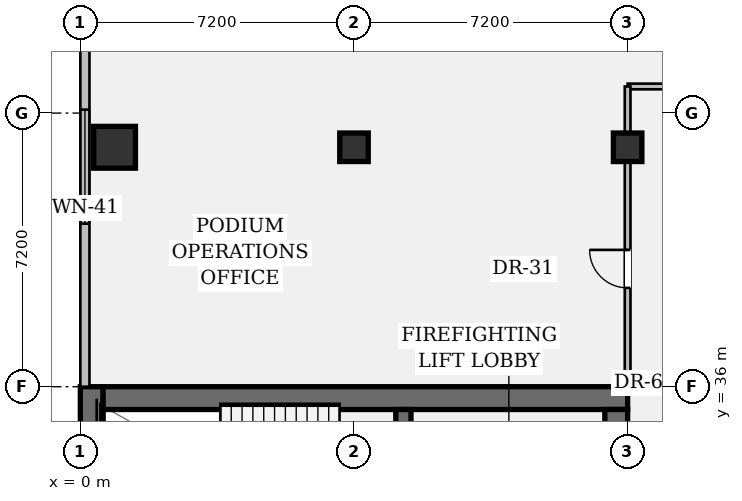
"""IFC4 building model, lengths in metres.
Left out: names, types, materials, properties, quantities, classifications, styles, units other than length and angle.
Written with IfcOpenShell. Run it as: python <this file> out.ifc"""

import sys

from ifc_helpers import new_model, si_unit, direction, frame, frame_2d, origin, origin_2d, place, context, subcontext, project, spatial, rectangle, hollow_rectangle, extrude, element, fill, save


model = new_model("IFC4")
c1 = context("Model", 3, precision=1e-05, world=origin(), true_north=direction((0.0, 1.0)))
c2 = subcontext(c1, "Body", "Model", "MODEL_VIEW")
j1 = project(units=[si_unit("LENGTHUNIT", "METRE"), si_unit("PLANEANGLEUNIT", "RADIAN")], contexts=[c1])
p1 = place(None, origin())
s1 = spatial("IfcSite", under=j1, at=p1, CompositionType="ELEMENT")
p2 = place(p1, origin())
s2 = spatial("IfcBuilding", under=s1, at=p2, CompositionType="ELEMENT")
p3 = place(p2, frame((0.0, 0.0, 17.85)))
s3 = spatial("IfcBuildingStorey", under=s2, at=p3, CompositionType="ELEMENT", Elevation=17.85)
p4 = place(p3, frame((0.3, 7.2, 0.0), z_axis=(0.0, 0.0, 1.0), x_axis=(0.0, 1.0, 0.0)))
e1 = element("IfcWall", 1, at=p4, inside=s3, PredefinedType="SHEAR", context=c2, shape_type="SweptSolid", body=[
    extrude(rectangle(XDim=28.8, YDim=0.6, at=frame_2d((14.4, 0.0))), origin(), (0.0, 0.0, 1.0), 3.91),
])
p5 = place(p3, frame((0.6, 35.7, 0.0), z_axis=(0.0, 0.0, 1.0), x_axis=(1.0, 0.0, 0.0)))
e2 = element("IfcWall", 2, at=p5, inside=s3, PredefinedType="SHEAR", context=c2, shape_type="SweptSolid", body=[
    extrude(rectangle(XDim=13.8, YDim=0.6, at=frame_2d((6.9, 0.0))), origin(), (0.0, 0.0, 1.0), 3.91),
])
p6 = place(p3, frame((14.1, 35.4, 0.0), z_axis=(0.0, 0.0, 1.0), x_axis=(0.0, -1.0, 0.0)))
e3 = element("IfcWall", 3, at=p6, inside=s3, PredefinedType="SHEAR", context=c2, shape_type="SweptSolid", body=[
    extrude(rectangle(XDim=27.6, YDim=0.6, at=frame_2d((13.8, 0.0))), origin(), (0.0, 0.0, 1.0), 3.91),
])
p7 = place(p6, frame((1.3, 0.0, 0.0)))
e4 = element("IfcOpeningElement", 4, at=p7, cuts=e3, PredefinedType="OPENING", context=c2, shape_type="SweptSolid", body=[
    extrude(rectangle(XDim=1.2, YDim=2.15, at=frame_2d((0.6, 1.075))), frame((0.0, 0.312, 0.0), z_axis=(0.0, -1.0, 0.0), x_axis=(1.0, 0.0, 0.0)), (0.0, 0.0, 1.0), 0.624),
])
p8 = place(p6, frame((25.25, 0.0, 0.0)))
e5 = element("IfcOpeningElement", 5, at=p8, cuts=e3, PredefinedType="OPENING", context=c2, shape_type="SweptSolid", body=[
    extrude(rectangle(XDim=1.2, YDim=2.15, at=frame_2d((0.6, 1.075))), frame((0.0, 0.312, 0.0), z_axis=(0.0, -1.0, 0.0), x_axis=(1.0, 0.0, 0.0)), (0.0, 0.0, 1.0), 0.624),
])
p9 = place(p6, frame((14.6, 0.0, 0.0)))
e6 = element("IfcOpeningElement", 6, at=p9, cuts=e3, PredefinedType="OPENING", context=c2, shape_type="SweptSolid", body=[
    extrude(rectangle(XDim=1.6, YDim=2.2, at=frame_2d((0.8, 1.1))), frame((0.0, 0.312, 0.0), z_axis=(0.0, -1.0, 0.0), x_axis=(1.0, 0.0, 0.0)), (0.0, 0.0, 1.0), 0.624),
])
p10 = place(p3, frame((8.5, 31.72, 0.0), z_axis=(0.0, 0.0, 1.0), x_axis=(0.0, 1.0, 0.0)))
e7 = element("IfcWall", 7, at=p10, inside=s3, PredefinedType="SHEAR", context=c2, shape_type="SweptSolid", body=[
    extrude(rectangle(XDim=3.68, YDim=0.4, at=frame_2d((1.84, 0.0))), origin(), (0.0, 0.0, 1.0), 3.91),
])
p11 = place(p10, frame((0.9, 0.0, 0.0)))
e8 = element("IfcOpeningElement", 8, at=p11, cuts=e7, PredefinedType="OPENING", context=c2, shape_type="SweptSolid", body=[
    extrude(rectangle(XDim=1.1, YDim=2.15, at=frame_2d((0.55, 1.075))), frame((0.0, 0.212, 0.0), z_axis=(0.0, -1.0, 0.0), x_axis=(1.0, 0.0, 0.0)), (0.0, 0.0, 1.0), 0.424),
])
p12 = place(p3, frame((0.9, 42.3, 0.0), z_axis=(0.0, 0.0, 1.0), x_axis=(1.0, 0.0, 0.0)))
e9 = element("IfcColumn", 9, at=p12, inside=s3, PredefinedType="COLUMN", context=c2, shape_type="SweptSolid", body=[
    extrude(hollow_rectangle(XDim=1.1, YDim=1.1, WallThickness=0.07, at=origin_2d()), origin(), (0.0, 0.0, 1.0), 3.91),
])
for number, where, z_axis, x_axis in (
    (10, (7.2, 42.3, 0.0), (0.0, 0.0, 1.0), (1.0, 0.0, 0.0)),
    (11, (14.4, 42.3, 0.0), (0.0, 0.0, 1.0), (1.0, 0.0, 0.0)),
):
    element("IfcColumn", number, at=place(p3, frame(where, z_axis=z_axis, x_axis=x_axis)), inside=s3, PredefinedType="COLUMN", context=c2, shape_type="SweptSolid", body=[
        extrude(rectangle(XDim=0.75, YDim=0.75, at=origin_2d()), origin(), (0.0, 0.0, 1.0), 3.91),
    ])
p13 = place(p3, frame((0.12, 36.0, 0.0), z_axis=(0.0, 0.0, 1.0), x_axis=(0.0, 1.0, 0.0)))
e12 = element("IfcWall", 12, at=p13, inside=s3, PredefinedType="STANDARD", context=c2, shape_type="SweptSolid", body=[
    extrude(rectangle(XDim=11.58, YDim=0.24, at=frame_2d((5.79, 0.0))), origin(), (0.0, 0.0, 1.0), 3.91),
])
p14 = place(p13, frame((4.29, 0.0, 0.95)))
e13 = element("IfcOpeningElement", 13, at=p14, cuts=e12, PredefinedType="OPENING", context=c2, shape_type="SweptSolid", body=[
    extrude(rectangle(XDim=3.0, YDim=1.5, at=frame_2d((1.5, 0.75))), frame((0.0, 0.132, 0.0), z_axis=(0.0, -1.0, 0.0), x_axis=(1.0, 0.0, 0.0)), (0.0, 0.0, 1.0), 0.264),
])
p15 = place(p3, frame((14.4, 43.9, 0.0), z_axis=(0.0, 0.0, 1.0), x_axis=(1.0, 0.0, 0.0)))
e14 = element("IfcWall", 14, at=p15, inside=s3, PredefinedType="PARTITIONING", context=c2, shape_type="SweptSolid", body=[
    extrude(rectangle(XDim=7.7, YDim=0.15, at=frame_2d((3.85, 0.0))), origin(), (0.0, 0.0, 1.0), 2.968),
])
p16 = place(p15, frame((3.6, 0.0, 0.0)))
e15 = element("IfcOpeningElement", 15, at=p16, cuts=e14, PredefinedType="OPENING", context=c2, shape_type="SweptSolid", body=[
    extrude(rectangle(XDim=1.0, YDim=2.15, at=frame_2d((0.5, 1.075))), frame((0.0, 0.087, 0.0), z_axis=(0.0, -1.0, 0.0), x_axis=(1.0, 0.0, 0.0)), (0.0, 0.0, 1.0), 0.174),
])
p17 = place(p3, frame((14.4, 36.0, 0.0), z_axis=(0.0, 0.0, 1.0), x_axis=(0.0, 1.0, 0.0)))
e16 = element("IfcWall", 16, at=p17, inside=s3, PredefinedType="PARTITIONING", context=c2, shape_type="SweptSolid", body=[
    extrude(rectangle(XDim=7.9, YDim=0.15, at=frame_2d((3.95, 0.0))), origin(), (0.0, 0.0, 1.0), 2.968),
])
p18 = place(p17, frame((2.6, 0.0, 0.0)))
e17 = element("IfcOpeningElement", 17, at=p18, cuts=e16, PredefinedType="OPENING", context=c2, shape_type="SweptSolid", body=[
    extrude(rectangle(XDim=1.0, YDim=2.15, at=frame_2d((0.5, 1.075))), frame((0.0, 0.087, 0.0), z_axis=(0.0, -1.0, 0.0), x_axis=(1.0, 0.0, 0.0)), (0.0, 0.0, 1.0), 0.174),
])
p19 = place(p14, origin())
e18 = element("IfcWindow", 18, at=p19, inside=s3, PartitioningType="SINGLE_PANEL", PredefinedType="WINDOW", context=c2, shape_type="SweptSolid", body=[
    extrude(rectangle(XDim=3.0, YDim=1.5, at=frame_2d((1.5, 0.75))), frame((0.0, 0.03, 0.0), z_axis=(0.0, -1.0, 0.0), x_axis=(1.0, 0.0, 0.0)), (0.0, 0.0, 1.0), 0.06),
])
fill(e13, e18)
p20 = place(p18, origin())
e19 = element("IfcDoor", 19, at=p20, inside=s3, OperationType="SINGLE_SWING_RIGHT", PredefinedType="DOOR", context=c2, shape_type="SweptSolid", body=[
    extrude(rectangle(XDim=1.0, YDim=2.15, at=frame_2d((0.5, 1.075))), frame((0.0, 0.025, 0.0), z_axis=(0.0, -1.0, 0.0), x_axis=(1.0, 0.0, 0.0)), (0.0, 0.0, 1.0), 0.05),
])
fill(e17, e19)
save(model, sys.argv[1])
